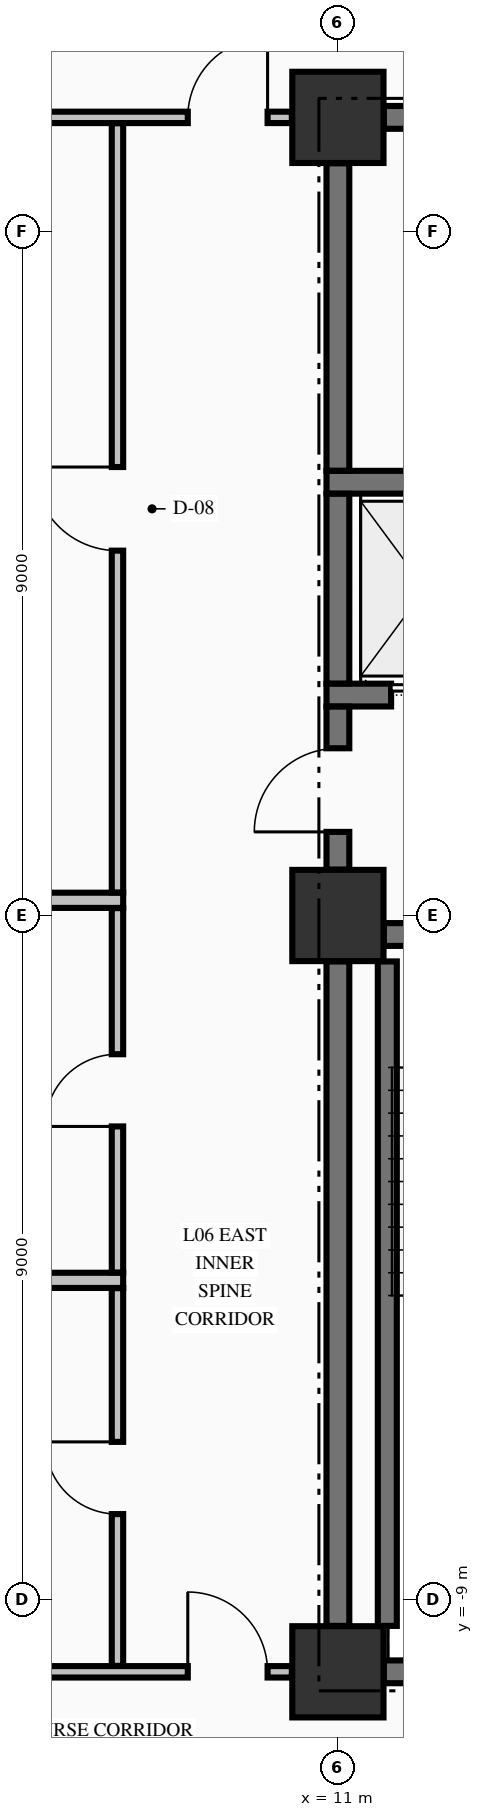
"""IFC4 building model, lengths in metres.
Left out: names, types, materials, properties, quantities, classifications, styles, units other than length and angle.
Written with IfcOpenShell. Run it as: python <this file> out.ifc"""

import sys

from ifc_helpers import new_model, si_unit, direction, frame, frame_2d, origin, origin_2d, place, context, subcontext, project, spatial, rectangle, extrude, element, fill, save


model = new_model("IFC4")
c1 = context("Model", 3, precision=1e-05, world=origin(), true_north=direction((0.0, 1.0)))
c2 = subcontext(c1, "Body", "Model", "MODEL_VIEW")
j1 = project(units=[si_unit("LENGTHUNIT", "METRE"), si_unit("PLANEANGLEUNIT", "RADIAN")], contexts=[c1])
p1 = place(None, origin())
s1 = spatial("IfcSite", under=j1, at=p1, CompositionType="ELEMENT")
p2 = place(p1, origin())
s2 = spatial("IfcBuilding", under=s1, at=p2, CompositionType="ELEMENT")
p3 = place(p2, frame((0.0, 0.0, 30.77)))
s3 = spatial("IfcBuildingStorey", under=s2, at=p3, CompositionType="ELEMENT", Elevation=30.77)
for number, where, z_axis, x_axis in (
    (1, (11.0, -9.95, -0.25), (0.0, 0.0, 1.0), (1.0, 0.0, 0.0)),
    (2, (11.0, 0.0, -0.25), (0.0, 0.0, 1.0), (1.0, 0.0, 0.0)),
    (3, (11.0, 10.5, -0.25), (0.0, 0.0, 1.0), (1.0, 0.0, 0.0)),
):
    element("IfcColumn", number, at=place(p3, frame(where, z_axis=z_axis, x_axis=x_axis)), inside=s3, PredefinedType="COLUMN", context=c2, shape_type="SweptSolid", body=[
        extrude(rectangle(XDim=1.2, YDim=1.2, at=origin_2d()), origin(), (0.0, 0.0, 1.0), 3.52),
    ])
p4 = place(p3, frame((11.604, -9.95, 0.0), z_axis=(0.0, 0.0, 1.0), x_axis=(1.0, 0.0, 0.0)))
e4 = element("IfcWall", 4, at=p4, inside=s3, PredefinedType="SHEAR", context=c2, shape_type="SweptSolid", body=[
    extrude(rectangle(XDim=3.096, YDim=0.3, at=frame_2d((1.548, 0.0))), origin(), (0.0, 0.0, 1.0), 3.27),
])
p5 = place(p3, frame((11.604, -0.25, 0.0), z_axis=(0.0, 0.0, 1.0), x_axis=(1.0, 0.0, 0.0)))
e5 = element("IfcWall", 5, at=p5, inside=s3, PredefinedType="SHEAR", context=c2, shape_type="SweptSolid", body=[
    extrude(rectangle(XDim=3.271, YDim=0.3, at=frame_2d((1.635, 0.0))), origin(), (0.0, 0.0, 1.0), 3.27),
])
p6 = place(p5, frame((0.996, 0.0, 0.0)))
e6 = element("IfcOpeningElement", 6, at=p6, cuts=e5, PredefinedType="OPENING", context=c2, shape_type="SweptSolid", body=[
    extrude(rectangle(XDim=1.1, YDim=2.15, at=frame_2d((0.55, 1.075))), frame((0.0, 0.16, 0.0), z_axis=(0.0, -1.0, 0.0), x_axis=(1.0, 0.0, 0.0)), (0.0, 0.0, 1.0), 0.32),
])
p7 = place(p3, frame((10.85, 2.9, 0.0), z_axis=(0.0, 0.0, 1.0), x_axis=(1.0, 0.0, 0.0)))
e7 = element("IfcWall", 7, at=p7, inside=s3, PredefinedType="SHEAR", context=c2, shape_type="SweptSolid", body=[
    extrude(rectangle(XDim=4.025, YDim=0.3, at=frame_2d((2.012, 0.0))), origin(), (0.0, 0.0, 1.0), 3.27),
])
p8 = place(p7, frame((0.85, 0.0, 0.0)))
e8 = element("IfcOpeningElement", 8, at=p8, cuts=e7, PredefinedType="OPENING", context=c2, shape_type="SweptSolid", body=[
    extrude(rectangle(XDim=1.1, YDim=2.2, at=frame_2d((0.55, 1.1))), frame((0.0, 0.16, 0.0), z_axis=(0.0, -1.0, 0.0), x_axis=(1.0, 0.0, 0.0)), (0.0, 0.0, 1.0), 0.32),
])
p9 = place(p3, frame((10.85, 5.7, 0.0), z_axis=(0.0, 0.0, 1.0), x_axis=(1.0, 0.0, 0.0)))
e9 = element("IfcWall", 9, at=p9, inside=s3, PredefinedType="SHEAR", context=c2, shape_type="SweptSolid", body=[
    extrude(rectangle(XDim=4.025, YDim=0.3, at=frame_2d((2.012, 0.0))), origin(), (0.0, 0.0, 1.0), 3.27),
])
p10 = place(p3, frame((11.604, 10.5, 0.0), z_axis=(0.0, 0.0, 1.0), x_axis=(1.0, 0.0, 0.0)))
e10 = element("IfcWall", 10, at=p10, inside=s3, PredefinedType="SHEAR", context=c2, shape_type="SweptSolid", body=[
    extrude(rectangle(XDim=3.096, YDim=0.3, at=frame_2d((1.548, 0.0))), origin(), (0.0, 0.0, 1.0), 3.27),
])
p11 = place(p10, frame((1.371, 0.0, 0.0)))
e11 = element("IfcOpeningElement", 11, at=p11, cuts=e10, PredefinedType="OPENING", context=c2, shape_type="SweptSolid", body=[
    extrude(rectangle(XDim=0.95, YDim=2.15, at=frame_2d((0.475, 1.075))), frame((0.0, 0.16, 0.0), z_axis=(0.0, -1.0, 0.0), x_axis=(1.0, 0.0, 0.0)), (0.0, 0.0, 1.0), 0.32),
])
p12 = place(p3, frame((-10.394, -9.95, 0.0), z_axis=(0.0, 0.0, 1.0), x_axis=(1.0, 0.0, 0.0)))
e12 = element("IfcWall", 12, at=p12, inside=s3, PredefinedType="PARTITIONING", context=c2, shape_type="SweptSolid", body=[
    extrude(rectangle(XDim=20.788, YDim=0.15, at=frame_2d((10.394, 0.0))), origin(), (0.0, 0.0, 1.0), 3.27),
])
p13 = place(p12, frame((0.319, 0.0, 0.0)))
e13 = element("IfcOpeningElement", 13, at=p13, cuts=e12, PredefinedType="OPENING", context=c2, shape_type="SweptSolid", body=[
    extrude(rectangle(XDim=1.05, YDim=2.15, at=frame_2d((0.525, 1.075))), frame((0.0, 0.085, 0.0), z_axis=(0.0, -1.0, 0.0), x_axis=(1.0, 0.0, 0.0)), (0.0, 0.0, 1.0), 0.17),
])
p14 = place(p12, frame((19.419, 0.0, 0.0)))
e14 = element("IfcOpeningElement", 14, at=p14, cuts=e12, PredefinedType="OPENING", context=c2, shape_type="SweptSolid", body=[
    extrude(rectangle(XDim=1.05, YDim=2.15, at=frame_2d((0.525, 1.075))), frame((0.0, 0.085, 0.0), z_axis=(0.0, -1.0, 0.0), x_axis=(1.0, 0.0, 0.0)), (0.0, 0.0, 1.0), 0.17),
])
p15 = place(p12, frame((11.569, 0.0, 0.0)))
e15 = element("IfcOpeningElement", 15, at=p15, cuts=e12, PredefinedType="OPENING", context=c2, shape_type="SweptSolid", body=[
    extrude(rectangle(XDim=0.95, YDim=2.15, at=frame_2d((0.475, 1.075))), frame((0.0, 0.085, 0.0), z_axis=(0.0, -1.0, 0.0), x_axis=(1.0, 0.0, 0.0)), (0.0, 0.0, 1.0), 0.17),
])
for number, where, z_axis, x_axis in (
    (16, (-1.9, -4.8, 0.0), (0.0, 0.0, 1.0), (1.0, 0.0, 0.0)),
    (17, (-1.9, 0.2, 0.0), (0.0, 0.0, 1.0), (1.0, 0.0, 0.0)),
):
    element("IfcWall", number, at=place(p3, frame(where, z_axis=z_axis, x_axis=x_axis)), inside=s3, PredefinedType="PARTITIONING", context=c2, shape_type="SweptSolid", body=[
        extrude(rectangle(XDim=10.075, YDim=0.2, at=frame_2d((5.038, 0.0))), origin(), (0.0, 0.0, 1.0), 3.27),
    ])
p16 = place(p3, frame((-10.394, 10.5, 0.0), z_axis=(0.0, 0.0, 1.0), x_axis=(1.0, 0.0, 0.0)))
e18 = element("IfcWall", 18, at=p16, inside=s3, PredefinedType="PARTITIONING", context=c2, shape_type="SweptSolid", body=[
    extrude(rectangle(XDim=20.788, YDim=0.15, at=frame_2d((10.394, 0.0))), origin(), (0.0, 0.0, 1.0), 3.27),
])
p17 = place(p16, frame((0.319, 0.0, 0.0)))
e19 = element("IfcOpeningElement", 19, at=p17, cuts=e18, PredefinedType="OPENING", context=c2, shape_type="SweptSolid", body=[
    extrude(rectangle(XDim=1.05, YDim=2.15, at=frame_2d((0.525, 1.075))), frame((0.0, 0.085, 0.0), z_axis=(0.0, -1.0, 0.0), x_axis=(1.0, 0.0, 0.0)), (0.0, 0.0, 1.0), 0.17),
])
p18 = place(p16, frame((19.419, 0.0, 0.0)))
e20 = element("IfcOpeningElement", 20, at=p18, cuts=e18, PredefinedType="OPENING", context=c2, shape_type="SweptSolid", body=[
    extrude(rectangle(XDim=1.05, YDim=2.15, at=frame_2d((0.525, 1.075))), frame((0.0, 0.085, 0.0), z_axis=(0.0, -1.0, 0.0), x_axis=(1.0, 0.0, 0.0)), (0.0, 0.0, 1.0), 0.17),
])
p19 = place(p3, frame((11.0, -9.346, 0.0), z_axis=(0.0, 0.0, 1.0), x_axis=(0.0, 1.0, 0.0)))
e21 = element("IfcWall", 21, at=p19, inside=s3, PredefinedType="SHEAR", context=c2, shape_type="SweptSolid", body=[
    extrude(rectangle(XDim=8.742, YDim=0.3, at=frame_2d((4.371, 0.0))), origin(), (0.0, 0.0, 1.0), 3.27),
])
p20 = place(p3, frame((11.0, 0.604, 0.0), z_axis=(0.0, 0.0, 1.0), x_axis=(0.0, 1.0, 0.0)))
e22 = element("IfcWall", 22, at=p20, inside=s3, PredefinedType="SHEAR", context=c2, shape_type="SweptSolid", body=[
    extrude(rectangle(XDim=2.144, YDim=0.3, at=frame_2d((1.072, 0.0))), origin(), (0.0, 0.0, 1.0), 3.27),
])
p21 = place(p20, frame((0.496, 0.0, 0.0)))
e23 = element("IfcOpeningElement", 23, at=p21, cuts=e22, PredefinedType="OPENING", context=c2, shape_type="SweptSolid", body=[
    extrude(rectangle(XDim=1.1, YDim=2.15, at=frame_2d((0.55, 1.075))), frame((0.0, 0.16, 0.0), z_axis=(0.0, -1.0, 0.0), x_axis=(1.0, 0.0, 0.0)), (0.0, 0.0, 1.0), 0.32),
])
p22 = place(p3, frame((11.0, 3.052, 0.0), z_axis=(0.0, 0.0, 1.0), x_axis=(0.0, 1.0, 0.0)))
e24 = element("IfcWall", 24, at=p22, inside=s3, PredefinedType="SHEAR", context=c2, shape_type="SweptSolid", body=[
    extrude(rectangle(XDim=2.496, YDim=0.3, at=frame_2d((1.248, 0.0))), origin(), (0.0, 0.0, 1.0), 3.27),
])
p23 = place(p3, frame((11.0, 5.852, 0.0), z_axis=(0.0, 0.0, 1.0), x_axis=(0.0, 1.0, 0.0)))
e25 = element("IfcWall", 25, at=p23, inside=s3, PredefinedType="SHEAR", context=c2, shape_type="SweptSolid", body=[
    extrude(rectangle(XDim=4.044, YDim=0.3, at=frame_2d((2.022, 0.0))), origin(), (0.0, 0.0, 1.0), 3.27),
])
p24 = place(p3, frame((11.65, -9.346, 0.0), z_axis=(0.0, 0.0, 1.0), x_axis=(0.0, 1.0, 0.0)))
e26 = element("IfcWall", 26, at=p24, inside=s3, PredefinedType="SOLIDWALL", context=c2, shape_type="SweptSolid", body=[
    extrude(rectangle(XDim=8.742, YDim=0.25, at=frame_2d((4.371, 0.0))), origin(), (0.0, 0.0, 1.0), 3.27),
])
p25 = place(p3, frame((8.1, -9.872, 0.0), z_axis=(0.0, 0.0, 1.0), x_axis=(0.0, 1.0, 0.0)))
e27 = element("IfcWall", 27, at=p25, inside=s3, PredefinedType="PARTITIONING", context=c2, shape_type="SweptSolid", body=[
    extrude(rectangle(XDim=4.969, YDim=0.15, at=frame_2d((2.484, 0.0))), origin(), (0.0, 0.0, 1.0), 3.27),
])
p26 = place(p25, frame((1.997, 0.0, 0.0)))
e28 = element("IfcOpeningElement", 28, at=p26, cuts=e27, PredefinedType="OPENING", context=c2, shape_type="SweptSolid", body=[
    extrude(rectangle(XDim=0.95, YDim=2.15, at=frame_2d((0.475, 1.075))), frame((0.0, 0.085, 0.0), z_axis=(0.0, -1.0, 0.0), x_axis=(1.0, 0.0, 0.0)), (0.0, 0.0, 1.0), 0.17),
])
p27 = place(p3, frame((8.1, -4.697, 0.0), z_axis=(0.0, 0.0, 1.0), x_axis=(0.0, 1.0, 0.0)))
e29 = element("IfcWall", 29, at=p27, inside=s3, PredefinedType="PARTITIONING", context=c2, shape_type="SweptSolid", body=[
    extrude(rectangle(XDim=4.794, YDim=0.15, at=frame_2d((2.397, 0.0))), origin(), (0.0, 0.0, 1.0), 3.27),
])
p28 = place(p27, frame((1.922, 0.0, 0.0)))
e30 = element("IfcOpeningElement", 30, at=p28, cuts=e29, PredefinedType="OPENING", context=c2, shape_type="SweptSolid", body=[
    extrude(rectangle(XDim=0.95, YDim=2.15, at=frame_2d((0.475, 1.075))), frame((0.0, 0.085, 0.0), z_axis=(0.0, -1.0, 0.0), x_axis=(1.0, 0.0, 0.0)), (0.0, 0.0, 1.0), 0.17),
])
p29 = place(p3, frame((8.1, 0.303, 0.0), z_axis=(0.0, 0.0, 1.0), x_axis=(0.0, 1.0, 0.0)))
e31 = element("IfcWall", 31, at=p29, inside=s3, PredefinedType="PARTITIONING", context=c2, shape_type="SweptSolid", body=[
    extrude(rectangle(XDim=10.119, YDim=0.15, at=frame_2d((5.06, 0.0))), origin(), (0.0, 0.0, 1.0), 3.27),
])
p30 = place(p29, frame((4.497, 0.0, 0.0)))
e32 = element("IfcOpeningElement", 32, at=p30, cuts=e31, PredefinedType="OPENING", context=c2, shape_type="SweptSolid", body=[
    extrude(rectangle(XDim=1.1, YDim=2.15, at=frame_2d((0.55, 1.075))), frame((0.0, 0.085, 0.0), z_axis=(0.0, -1.0, 0.0), x_axis=(1.0, 0.0, 0.0)), (0.0, 0.0, 1.0), 0.17),
])
p31 = place(p21, origin())
e33 = element("IfcDoor", 33, at=p31, inside=s3, OperationType="SINGLE_SWING_LEFT", PredefinedType="DOOR", context=c2, shape_type="SweptSolid", body=[
    extrude(rectangle(XDim=1.1, YDim=2.15, at=frame_2d((0.55, 1.075))), frame((0.0, 0.025, 0.0), z_axis=(0.0, -1.0, 0.0), x_axis=(1.0, 0.0, 0.0)), (0.0, 0.0, 1.0), 0.05),
])
fill(e23, e33)
p32 = place(p8, origin())
e34 = element("IfcDoor", 34, at=p32, inside=s3, OperationType="SLIDING_TO_RIGHT", PredefinedType="DOOR", context=c2, shape_type="SweptSolid", body=[
    extrude(rectangle(XDim=1.1, YDim=2.2, at=frame_2d((0.55, 1.1))), frame((0.0, 0.025, 0.0), z_axis=(0.0, -1.0, 0.0), x_axis=(1.0, 0.0, 0.0)), (0.0, 0.0, 1.0), 0.05),
])
fill(e8, e34)
p33 = place(p18, origin())
e35 = element("IfcDoor", 35, at=p33, inside=s3, OperationType="SINGLE_SWING_RIGHT", PredefinedType="DOOR", context=c2, shape_type="SweptSolid", body=[
    extrude(rectangle(XDim=1.05, YDim=2.15, at=frame_2d((0.525, 1.075))), frame((0.0, 0.025, 0.0), z_axis=(0.0, -1.0, 0.0), x_axis=(1.0, 0.0, 0.0)), (0.0, 0.0, 1.0), 0.05),
])
fill(e20, e35)
p34 = place(p14, origin())
e36 = element("IfcDoor", 36, at=p34, inside=s3, OperationType="SINGLE_SWING_LEFT", PredefinedType="DOOR", context=c2, shape_type="SweptSolid", body=[
    extrude(rectangle(XDim=1.05, YDim=2.15, at=frame_2d((0.525, 1.075))), frame((0.0, 0.025, 0.0), z_axis=(0.0, -1.0, 0.0), x_axis=(1.0, 0.0, 0.0)), (0.0, 0.0, 1.0), 0.05),
])
fill(e14, e36)
p35 = place(p30, origin())
e37 = element("IfcDoor", 37, at=p35, inside=s3, OperationType="SINGLE_SWING_RIGHT", PredefinedType="DOOR", context=c2, shape_type="SweptSolid", body=[
    extrude(rectangle(XDim=1.1, YDim=2.15, at=frame_2d((0.55, 1.075))), frame((0.0, 0.025, 0.0), z_axis=(0.0, -1.0, 0.0), x_axis=(1.0, 0.0, 0.0)), (0.0, 0.0, 1.0), 0.05),
])
fill(e32, e37)
p36 = place(p28, origin())
e38 = element("IfcDoor", 38, at=p36, inside=s3, OperationType="SINGLE_SWING_LEFT", PredefinedType="DOOR", context=c2, shape_type="SweptSolid", body=[
    extrude(rectangle(XDim=0.95, YDim=2.15, at=frame_2d((0.475, 1.075))), frame((0.0, 0.025, 0.0), z_axis=(0.0, -1.0, 0.0), x_axis=(1.0, 0.0, 0.0)), (0.0, 0.0, 1.0), 0.05),
])
fill(e30, e38)
p37 = place(p26, origin())
e39 = element("IfcDoor", 39, at=p37, inside=s3, OperationType="SINGLE_SWING_RIGHT", PredefinedType="DOOR", context=c2, shape_type="SweptSolid", body=[
    extrude(rectangle(XDim=0.95, YDim=2.15, at=frame_2d((0.475, 1.075))), frame((0.0, 0.025, 0.0), z_axis=(0.0, -1.0, 0.0), x_axis=(1.0, 0.0, 0.0)), (0.0, 0.0, 1.0), 0.05),
])
fill(e28, e39)
save(model, sys.argv[1])
